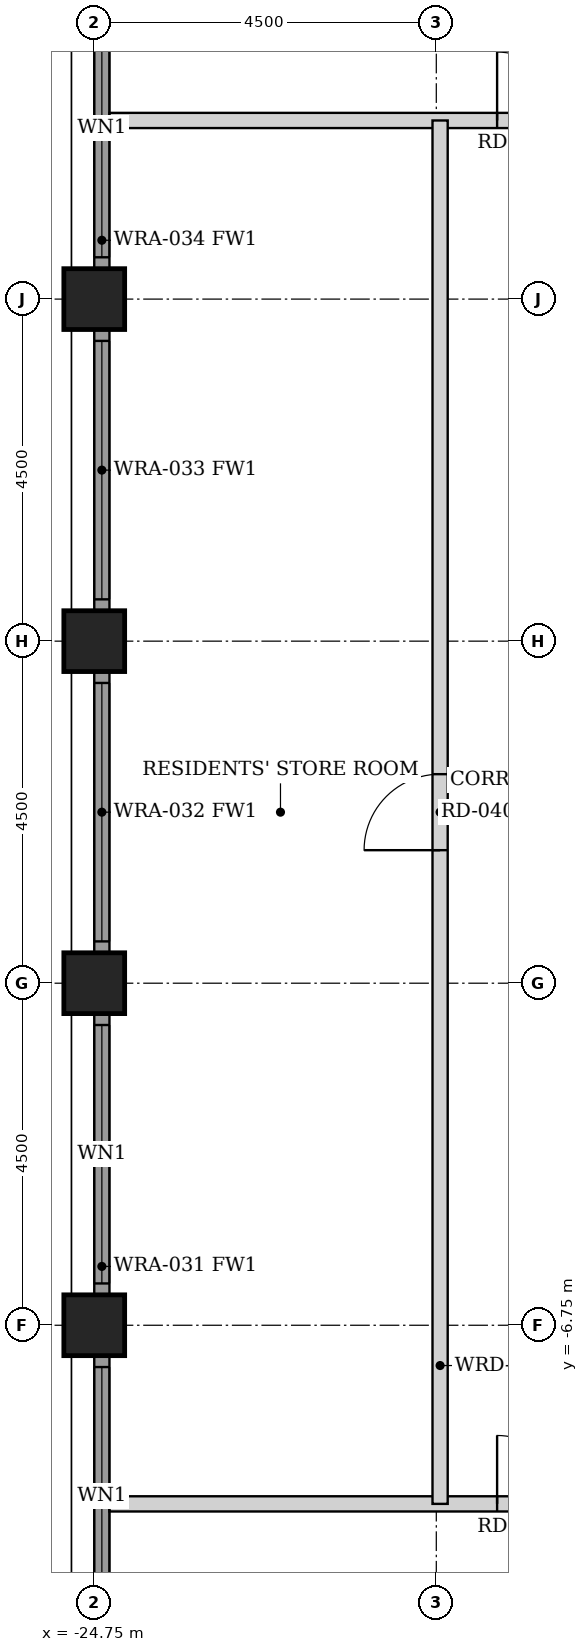
"""IFC4 building model, lengths in metres.
Left out: names, types, materials, properties, quantities, classifications, styles, units other than length and angle.
Written with IfcOpenShell. Run it as: python <this file> out.ifc"""

import sys

from ifc_helpers import new_model, si_unit, direction, frame, frame_2d, origin, origin_2d, place, context, subcontext, project, spatial, rectangle, hollow_rectangle, extrude, element, fill, save


model = new_model("IFC4")
c1 = context("Model", 3, precision=1e-05, world=origin(), true_north=direction((0.0, 1.0)))
c2 = subcontext(c1, "Body", "Model", "MODEL_VIEW")
j1 = project(units=[si_unit("LENGTHUNIT", "METRE"), si_unit("PLANEANGLEUNIT", "RADIAN")], contexts=[c1])
p1 = place(None, origin())
s1 = spatial("IfcSite", under=j1, at=p1, CompositionType="ELEMENT")
p2 = place(p1, origin())
s2 = spatial("IfcBuilding", under=s1, at=p2, CompositionType="ELEMENT")
p3 = place(p2, frame((0.0, 0.0, 58.0)))
s3 = spatial("IfcBuildingStorey", under=s2, at=p3, CompositionType="ELEMENT", Elevation=58.0)
for number, where, z_axis, x_axis in (
    (1, (-24.75, -6.75, 0.0), (0.0, 0.0, 1.0), (1.0, 0.0, 0.0)),
    (2, (-24.75, -2.25, 0.0), (0.0, 0.0, 1.0), (1.0, 0.0, 0.0)),
    (3, (-24.75, 2.25, 0.0), (0.0, 0.0, 1.0), (1.0, 0.0, 0.0)),
    (4, (-24.75, 6.75, 0.0), (0.0, 0.0, 1.0), (1.0, 0.0, 0.0)),
):
    element("IfcColumn", number, at=place(p3, frame(where, z_axis=z_axis, x_axis=x_axis)), inside=s3, PredefinedType="COLUMN", context=c2, shape_type="SweptSolid", body=[
        extrude(hollow_rectangle(XDim=0.8, YDim=0.8, WallThickness=0.06, at=origin_2d()), origin(), (0.0, 0.0, 1.0), 3.5),
    ])
p4 = place(p3, frame((-24.65, -10.845, 0.0), z_axis=(0.0, 0.0, 1.0), x_axis=(0.0, 1.0, 0.0)))
e5 = element("IfcWall", 5, at=p4, inside=s3, PredefinedType="SOLIDWALL", context=c2, shape_type="SweptSolid", body=[
    extrude(rectangle(XDim=3.69, YDim=0.2, at=frame_2d((1.845, 0.0))), origin(), (0.0, 0.0, 1.0), 2.379),
])
p5 = place(p4, frame((0.145, 0.0, 0.3)))
e6 = element("IfcOpeningElement", 6, at=p5, cuts=e5, PredefinedType="OPENING", context=c2, shape_type="SweptSolid", body=[
    extrude(rectangle(XDim=3.4, YDim=1.929, at=frame_2d((1.7, 0.964))), frame((0.0, 0.11, 0.0), z_axis=(0.0, -1.0, 0.0), x_axis=(1.0, 0.0, 0.0)), (0.0, 0.0, 1.0), 0.22),
])
p6 = place(p3, frame((-24.65, -6.345, 0.0), z_axis=(0.0, 0.0, 1.0), x_axis=(0.0, 1.0, 0.0)))
e7 = element("IfcWall", 7, at=p6, inside=s3, PredefinedType="SOLIDWALL", context=c2, shape_type="SweptSolid", body=[
    extrude(rectangle(XDim=3.69, YDim=0.2, at=frame_2d((1.845, 0.0))), origin(), (0.0, 0.0, 1.0), 2.379),
])
p7 = place(p6, frame((0.145, 0.0, 0.3)))
e8 = element("IfcOpeningElement", 8, at=p7, cuts=e7, PredefinedType="OPENING", context=c2, shape_type="SweptSolid", body=[
    extrude(rectangle(XDim=3.4, YDim=1.929, at=frame_2d((1.7, 0.964))), frame((0.0, 0.11, 0.0), z_axis=(0.0, -1.0, 0.0), x_axis=(1.0, 0.0, 0.0)), (0.0, 0.0, 1.0), 0.22),
])
p8 = place(p3, frame((-24.65, -1.845, 0.0), z_axis=(0.0, 0.0, 1.0), x_axis=(0.0, 1.0, 0.0)))
e9 = element("IfcWall", 9, at=p8, inside=s3, PredefinedType="SOLIDWALL", context=c2, shape_type="SweptSolid", body=[
    extrude(rectangle(XDim=3.69, YDim=0.2, at=frame_2d((1.845, 0.0))), origin(), (0.0, 0.0, 1.0), 2.379),
])
p9 = place(p8, frame((0.145, 0.0, 0.3)))
e10 = element("IfcOpeningElement", 10, at=p9, cuts=e9, PredefinedType="OPENING", context=c2, shape_type="SweptSolid", body=[
    extrude(rectangle(XDim=3.4, YDim=1.929, at=frame_2d((1.7, 0.964))), frame((0.0, 0.11, 0.0), z_axis=(0.0, -1.0, 0.0), x_axis=(1.0, 0.0, 0.0)), (0.0, 0.0, 1.0), 0.22),
])
p10 = place(p3, frame((-24.65, 2.655, 0.0), z_axis=(0.0, 0.0, 1.0), x_axis=(0.0, 1.0, 0.0)))
e11 = element("IfcWall", 11, at=p10, inside=s3, PredefinedType="SOLIDWALL", context=c2, shape_type="SweptSolid", body=[
    extrude(rectangle(XDim=3.69, YDim=0.2, at=frame_2d((1.845, 0.0))), origin(), (0.0, 0.0, 1.0), 2.379),
])
p11 = place(p10, frame((0.145, 0.0, 0.3)))
e12 = element("IfcOpeningElement", 12, at=p11, cuts=e11, PredefinedType="OPENING", context=c2, shape_type="SweptSolid", body=[
    extrude(rectangle(XDim=3.4, YDim=1.929, at=frame_2d((1.7, 0.964))), frame((0.0, 0.11, 0.0), z_axis=(0.0, -1.0, 0.0), x_axis=(1.0, 0.0, 0.0)), (0.0, 0.0, 1.0), 0.22),
])
p12 = place(p3, frame((-24.65, 7.155, 0.0), z_axis=(0.0, 0.0, 1.0), x_axis=(0.0, 1.0, 0.0)))
e13 = element("IfcWall", 13, at=p12, inside=s3, PredefinedType="SOLIDWALL", context=c2, shape_type="SweptSolid", body=[
    extrude(rectangle(XDim=3.69, YDim=0.2, at=frame_2d((1.845, 0.0))), origin(), (0.0, 0.0, 1.0), 2.379),
])
p13 = place(p12, frame((0.145, 0.0, 0.3)))
e14 = element("IfcOpeningElement", 14, at=p13, cuts=e13, PredefinedType="OPENING", context=c2, shape_type="SweptSolid", body=[
    extrude(rectangle(XDim=3.4, YDim=1.929, at=frame_2d((1.7, 0.964))), frame((0.0, 0.11, 0.0), z_axis=(0.0, -1.0, 0.0), x_axis=(1.0, 0.0, 0.0)), (0.0, 0.0, 1.0), 0.22),
])
p14 = place(p3, frame((-24.55, 9.1, 0.0), z_axis=(0.0, 0.0, 1.0), x_axis=(1.0, 0.0, 0.0)))
e15 = element("IfcWall", 15, at=p14, inside=s3, PredefinedType="PARTITIONING", context=c2, shape_type="SweptSolid", body=[
    extrude(rectangle(XDim=49.1, YDim=0.2, at=frame_2d((24.55, 0.0))), origin(), (0.0, 0.0, 1.0), 2.373),
])
p15 = place(p14, frame((5.1, 0.0, 0.0)))
e16 = element("IfcOpeningElement", 16, at=p15, cuts=e15, PredefinedType="OPENING", context=c2, shape_type="SweptSolid", body=[
    extrude(rectangle(XDim=0.9, YDim=2.1, at=frame_2d((0.45, 1.05))), frame((0.0, 0.11, 0.0), z_axis=(0.0, -1.0, 0.0), x_axis=(1.0, 0.0, 0.0)), (0.0, 0.0, 1.0), 0.22),
])
p16 = place(p14, frame((13.5, 0.0, 0.0)))
e17 = element("IfcOpeningElement", 17, at=p16, cuts=e15, PredefinedType="OPENING", context=c2, shape_type="SweptSolid", body=[
    extrude(rectangle(XDim=0.9, YDim=2.1, at=frame_2d((0.45, 1.05))), frame((0.0, 0.11, 0.0), z_axis=(0.0, -1.0, 0.0), x_axis=(1.0, 0.0, 0.0)), (0.0, 0.0, 1.0), 0.22),
])
p17 = place(p14, frame((18.1, 0.0, 0.0)))
e18 = element("IfcOpeningElement", 18, at=p17, cuts=e15, PredefinedType="OPENING", context=c2, shape_type="SweptSolid", body=[
    extrude(rectangle(XDim=0.9, YDim=2.1, at=frame_2d((0.45, 1.05))), frame((0.0, 0.11, 0.0), z_axis=(0.0, -1.0, 0.0), x_axis=(1.0, 0.0, 0.0)), (0.0, 0.0, 1.0), 0.22),
])
p18 = place(p14, frame((31.5, 0.0, 0.0)))
e19 = element("IfcOpeningElement", 19, at=p18, cuts=e15, PredefinedType="OPENING", context=c2, shape_type="SweptSolid", body=[
    extrude(rectangle(XDim=0.9, YDim=2.1, at=frame_2d((0.45, 1.05))), frame((0.0, 0.11, 0.0), z_axis=(0.0, -1.0, 0.0), x_axis=(1.0, 0.0, 0.0)), (0.0, 0.0, 1.0), 0.22),
])
p19 = place(p14, frame((43.1, 0.0, 0.0)))
e20 = element("IfcOpeningElement", 20, at=p19, cuts=e15, PredefinedType="OPENING", context=c2, shape_type="SweptSolid", body=[
    extrude(rectangle(XDim=0.9, YDim=2.1, at=frame_2d((0.45, 1.05))), frame((0.0, 0.11, 0.0), z_axis=(0.0, -1.0, 0.0), x_axis=(1.0, 0.0, 0.0)), (0.0, 0.0, 1.0), 0.22),
])
p20 = place(p3, frame((-24.55, -9.1, 0.0), z_axis=(0.0, 0.0, 1.0), x_axis=(1.0, 0.0, 0.0)))
e21 = element("IfcWall", 21, at=p20, inside=s3, PredefinedType="PARTITIONING", context=c2, shape_type="SweptSolid", body=[
    extrude(rectangle(XDim=49.1, YDim=0.2, at=frame_2d((24.55, 0.0))), origin(), (0.0, 0.0, 1.0), 2.373),
])
p21 = place(p20, frame((5.1, 0.0, 0.0)))
e22 = element("IfcOpeningElement", 22, at=p21, cuts=e21, PredefinedType="OPENING", context=c2, shape_type="SweptSolid", body=[
    extrude(rectangle(XDim=0.9, YDim=2.1, at=frame_2d((0.45, 1.05))), frame((0.0, 0.11, 0.0), z_axis=(0.0, -1.0, 0.0), x_axis=(1.0, 0.0, 0.0)), (0.0, 0.0, 1.0), 0.22),
])
p22 = place(p20, frame((18.1, 0.0, 0.0)))
e23 = element("IfcOpeningElement", 23, at=p22, cuts=e21, PredefinedType="OPENING", context=c2, shape_type="SweptSolid", body=[
    extrude(rectangle(XDim=0.9, YDim=2.1, at=frame_2d((0.45, 1.05))), frame((0.0, 0.11, 0.0), z_axis=(0.0, -1.0, 0.0), x_axis=(1.0, 0.0, 0.0)), (0.0, 0.0, 1.0), 0.22),
])
p23 = place(p20, frame((22.5, 0.0, 0.0)))
e24 = element("IfcOpeningElement", 24, at=p23, cuts=e21, PredefinedType="OPENING", context=c2, shape_type="SweptSolid", body=[
    extrude(rectangle(XDim=0.9, YDim=2.1, at=frame_2d((0.45, 1.05))), frame((0.0, 0.11, 0.0), z_axis=(0.0, -1.0, 0.0), x_axis=(1.0, 0.0, 0.0)), (0.0, 0.0, 1.0), 0.22),
])
p24 = place(p20, frame((27.1, 0.0, 0.0)))
e25 = element("IfcOpeningElement", 25, at=p24, cuts=e21, PredefinedType="OPENING", context=c2, shape_type="SweptSolid", body=[
    extrude(rectangle(XDim=0.9, YDim=2.1, at=frame_2d((0.45, 1.05))), frame((0.0, 0.11, 0.0), z_axis=(0.0, -1.0, 0.0), x_axis=(1.0, 0.0, 0.0)), (0.0, 0.0, 1.0), 0.22),
])
p25 = place(p20, frame((43.1, 0.0, 0.0)))
e26 = element("IfcOpeningElement", 26, at=p25, cuts=e21, PredefinedType="OPENING", context=c2, shape_type="SweptSolid", body=[
    extrude(rectangle(XDim=0.9, YDim=2.1, at=frame_2d((0.45, 1.05))), frame((0.0, 0.11, 0.0), z_axis=(0.0, -1.0, 0.0), x_axis=(1.0, 0.0, 0.0)), (0.0, 0.0, 1.0), 0.22),
])
p26 = place(p3, frame((-20.2, -9.1, 0.0), z_axis=(0.0, 0.0, 1.0), x_axis=(0.0, 1.0, 0.0)))
e27 = element("IfcWall", 27, at=p26, inside=s3, PredefinedType="PARTITIONING", context=c2, shape_type="SweptSolid", body=[
    extrude(rectangle(XDim=18.2, YDim=0.2, at=frame_2d((9.1, 0.0))), origin(), (0.0, 0.0, 1.0), 2.373),
])
p27 = place(p26, frame((8.6, 0.0, 0.0)))
e28 = element("IfcOpeningElement", 28, at=p27, cuts=e27, PredefinedType="OPENING", context=c2, shape_type="SweptSolid", body=[
    extrude(rectangle(XDim=1.0, YDim=2.1, at=frame_2d((0.5, 1.05))), frame((0.0, 0.11, 0.0), z_axis=(0.0, -1.0, 0.0), x_axis=(1.0, 0.0, 0.0)), (0.0, 0.0, 1.0), 0.22),
])
p28 = place(p5, origin())
e29 = element("IfcWindow", 29, at=p28, inside=s3, PartitioningType="SINGLE_PANEL", PredefinedType="WINDOW", context=c2, shape_type="SweptSolid", body=[
    extrude(rectangle(XDim=3.4, YDim=1.929, at=frame_2d((1.7, 0.964))), frame((0.0, 0.03, 0.0), z_axis=(0.0, -1.0, 0.0), x_axis=(1.0, 0.0, 0.0)), (0.0, 0.0, 1.0), 0.06),
])
fill(e6, e29)
p29 = place(p7, origin())
e30 = element("IfcWindow", 30, at=p29, inside=s3, PartitioningType="SINGLE_PANEL", PredefinedType="WINDOW", context=c2, shape_type="SweptSolid", body=[
    extrude(rectangle(XDim=3.4, YDim=1.929, at=frame_2d((1.7, 0.964))), frame((0.0, 0.03, 0.0), z_axis=(0.0, -1.0, 0.0), x_axis=(1.0, 0.0, 0.0)), (0.0, 0.0, 1.0), 0.06),
])
fill(e8, e30)
p30 = place(p9, origin())
e31 = element("IfcWindow", 31, at=p30, inside=s3, PartitioningType="SINGLE_PANEL", PredefinedType="WINDOW", context=c2, shape_type="SweptSolid", body=[
    extrude(rectangle(XDim=3.4, YDim=1.929, at=frame_2d((1.7, 0.964))), frame((0.0, 0.03, 0.0), z_axis=(0.0, -1.0, 0.0), x_axis=(1.0, 0.0, 0.0)), (0.0, 0.0, 1.0), 0.06),
])
fill(e10, e31)
p31 = place(p11, origin())
e32 = element("IfcWindow", 32, at=p31, inside=s3, PartitioningType="SINGLE_PANEL", PredefinedType="WINDOW", context=c2, shape_type="SweptSolid", body=[
    extrude(rectangle(XDim=3.4, YDim=1.929, at=frame_2d((1.7, 0.964))), frame((0.0, 0.03, 0.0), z_axis=(0.0, -1.0, 0.0), x_axis=(1.0, 0.0, 0.0)), (0.0, 0.0, 1.0), 0.06),
])
fill(e12, e32)
p32 = place(p13, origin())
e33 = element("IfcWindow", 33, at=p32, inside=s3, PartitioningType="SINGLE_PANEL", PredefinedType="WINDOW", context=c2, shape_type="SweptSolid", body=[
    extrude(rectangle(XDim=3.4, YDim=1.929, at=frame_2d((1.7, 0.964))), frame((0.0, 0.03, 0.0), z_axis=(0.0, -1.0, 0.0), x_axis=(1.0, 0.0, 0.0)), (0.0, 0.0, 1.0), 0.06),
])
fill(e14, e33)
p33 = place(p15, origin())
e34 = element("IfcDoor", 34, at=p33, inside=s3, OperationType="SINGLE_SWING_LEFT", PredefinedType="DOOR", context=c2, shape_type="SweptSolid", body=[
    extrude(rectangle(XDim=0.9, YDim=2.1, at=frame_2d((0.45, 1.05))), frame((0.0, 0.025, 0.0), z_axis=(0.0, -1.0, 0.0), x_axis=(1.0, 0.0, 0.0)), (0.0, 0.0, 1.0), 0.05),
])
fill(e16, e34)
p34 = place(p21, origin())
e35 = element("IfcDoor", 35, at=p34, inside=s3, OperationType="SINGLE_SWING_LEFT", PredefinedType="DOOR", context=c2, shape_type="SweptSolid", body=[
    extrude(rectangle(XDim=0.9, YDim=2.1, at=frame_2d((0.45, 1.05))), frame((0.0, 0.025, 0.0), z_axis=(0.0, -1.0, 0.0), x_axis=(1.0, 0.0, 0.0)), (0.0, 0.0, 1.0), 0.05),
])
fill(e22, e35)
p35 = place(p27, origin())
e36 = element("IfcDoor", 36, at=p35, inside=s3, OperationType="SINGLE_SWING_LEFT", PredefinedType="DOOR", context=c2, shape_type="SweptSolid", body=[
    extrude(rectangle(XDim=1.0, YDim=2.1, at=frame_2d((0.5, 1.05))), frame((0.0, 0.025, 0.0), z_axis=(0.0, -1.0, 0.0), x_axis=(1.0, 0.0, 0.0)), (0.0, 0.0, 1.0), 0.05),
])
fill(e28, e36)
save(model, sys.argv[1])
